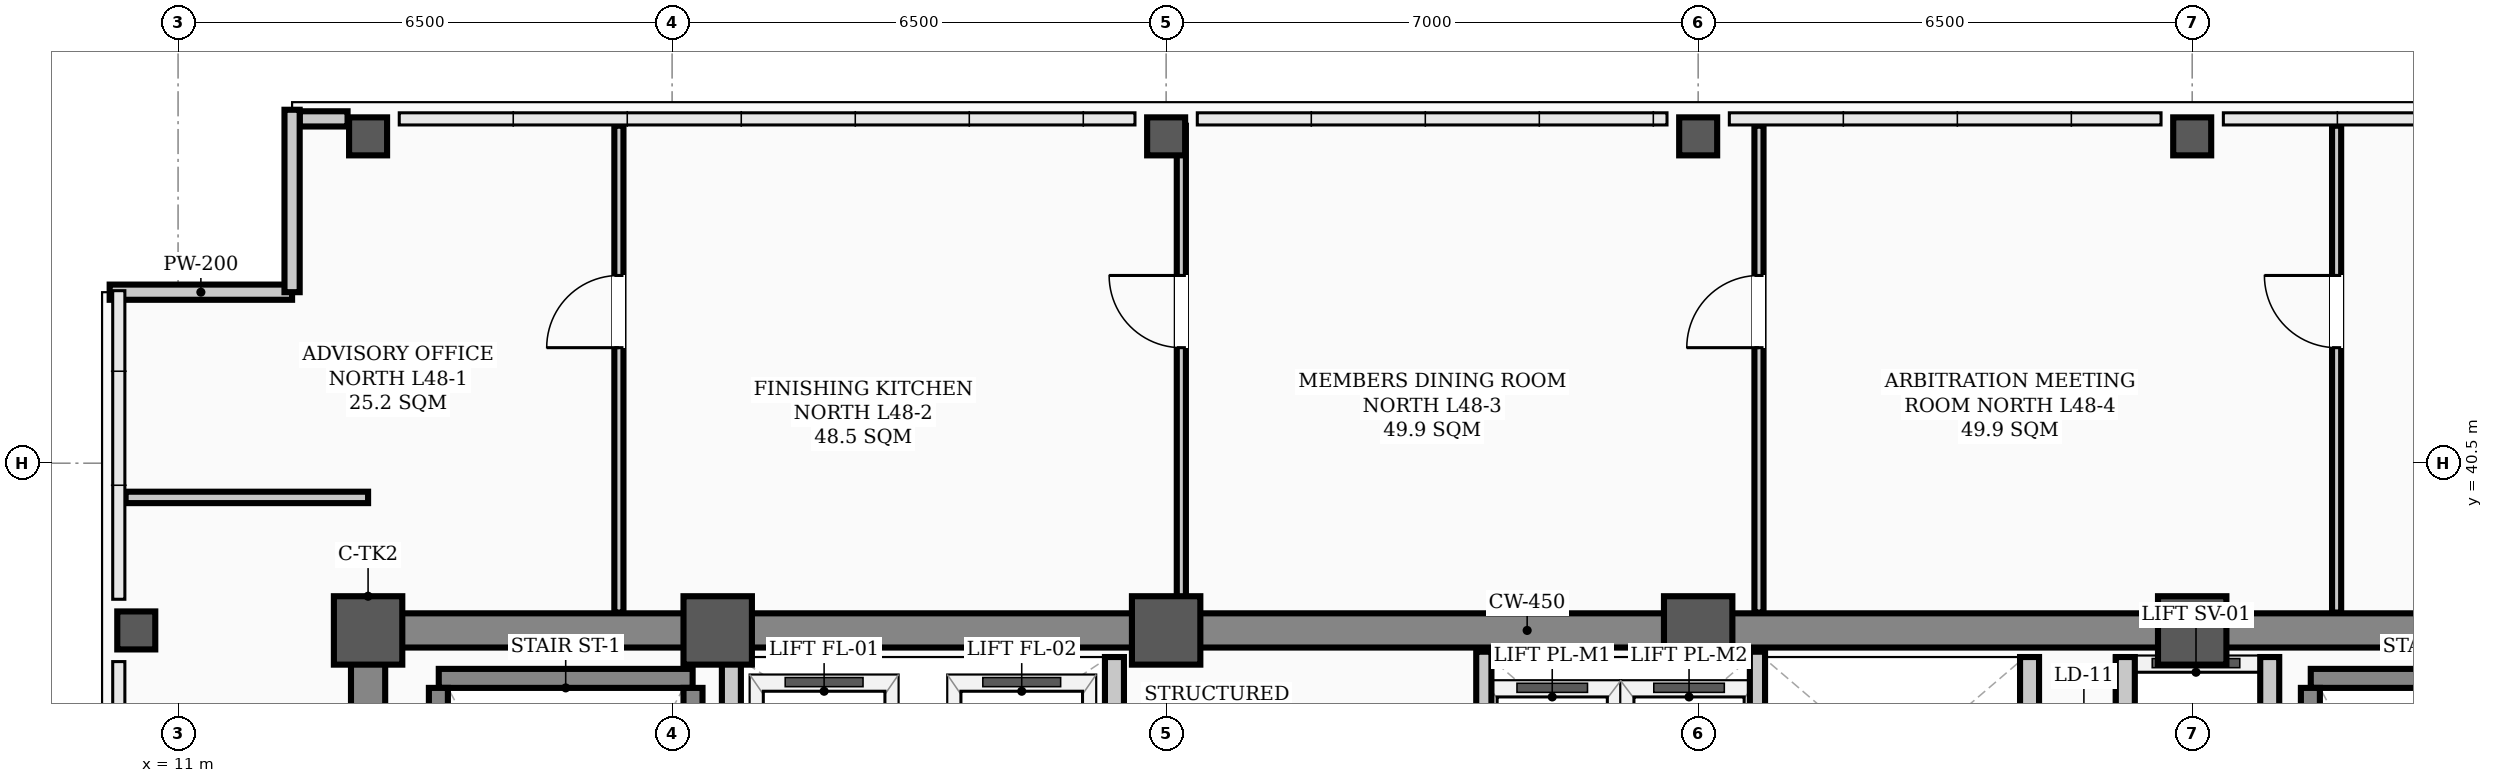
"""IFC4 building model, lengths in metres.
Left out: names, types, materials, properties, quantities, classifications, styles, units other than length and angle.
Written with IfcOpenShell. Run it as: python <this file> out.ifc"""

import sys

from ifc_helpers import new_model, si_unit, direction, frame, frame_2d, origin, origin_2d, place, context, subcontext, project, spatial, rectangle, hollow_rectangle, extrude, element, fill, save


model = new_model("IFC4")
c1 = context("Model", 3, precision=1e-05, world=origin(), true_north=direction((0.0, 1.0)))
c2 = subcontext(c1, "Body", "Model", "MODEL_VIEW")
j1 = project(units=[si_unit("LENGTHUNIT", "METRE"), si_unit("PLANEANGLEUNIT", "RADIAN")], contexts=[c1])
p1 = place(None, origin())
s1 = spatial("IfcSite", under=j1, at=p1, CompositionType="ELEMENT")
p2 = place(p1, origin())
s2 = spatial("IfcBuilding", under=s1, at=p2, CompositionType="ELEMENT")
p3 = place(p2, frame((0.0, 0.0, 192.9)))
s3 = spatial("IfcBuildingStorey", under=s2, at=p3, CompositionType="ELEMENT", Elevation=192.9)
for number, where, z_axis, x_axis in (
    (1, (13.5, 38.3, 0.0), (0.0, 0.0, 1.0), (1.0, 0.0, 0.0)),
    (2, (18.1, 38.3, 0.0), (0.0, 0.0, 1.0), (1.0, 0.0, 0.0)),
    (3, (24.0, 38.3, 0.0), (0.0, 0.0, 1.0), (1.0, 0.0, 0.0)),
    (4, (31.0, 38.3, 0.0), (0.0, 0.0, 1.0), (1.0, 0.0, 0.0)),
    (5, (37.5, 38.3, 0.0), (0.0, 0.0, 1.0), (1.0, 0.0, 0.0)),
):
    element("IfcColumn", number, at=place(p3, frame(where, z_axis=z_axis, x_axis=x_axis)), inside=s3, PredefinedType="COLUMN", context=c2, shape_type="SweptSolid", body=[
        extrude(hollow_rectangle(XDim=0.9, YDim=0.9, WallThickness=0.035, InnerFilletRadius=0.017, OuterFilletRadius=0.052, at=origin_2d()), origin(), (0.0, 0.0, 1.0), 3.9),
    ])
p4 = place(p3, frame((10.45, 38.3, 0.0), z_axis=(0.0, 0.0, 1.0), x_axis=(1.0, 0.0, 0.0)))
e6 = element("IfcColumn", 6, at=p4, inside=s3, PredefinedType="COLUMN", context=c2, shape_type="SweptSolid", body=[
    extrude(hollow_rectangle(XDim=0.5, YDim=0.5, WallThickness=0.024, InnerFilletRadius=0.012, OuterFilletRadius=0.036, at=origin_2d()), origin(), (0.0, 0.0, 1.0), 3.9),
])
for number, where, z_axis, x_axis in (
    (7, (13.5, 44.8, 0.0), (0.0, 0.0, 1.0), (1.0, 0.0, 0.0)),
    (8, (24.0, 44.8, 0.0), (0.0, 0.0, 1.0), (1.0, 0.0, 0.0)),
    (9, (31.0, 44.8, 0.0), (0.0, 0.0, 1.0), (1.0, 0.0, 0.0)),
    (10, (37.5, 44.8, 0.0), (0.0, 0.0, 1.0), (1.0, 0.0, 0.0)),
):
    element("IfcColumn", number, at=place(p3, frame(where, z_axis=z_axis, x_axis=x_axis)), inside=s3, PredefinedType="COLUMN", context=c2, shape_type="SweptSolid", body=[
        extrude(hollow_rectangle(XDim=0.5, YDim=0.5, WallThickness=0.024, InnerFilletRadius=0.012, OuterFilletRadius=0.036, at=origin_2d()), origin(), (0.0, 0.0, 1.0), 3.66),
    ])
p5 = place(p3, frame((12.6, 45.03, 0.0), z_axis=(0.0, 0.0, 1.0), x_axis=(1.0, 0.0, 0.0)))
e11 = element("IfcWall", 11, at=p5, inside=s3, PredefinedType="PARAPET", context=c2, shape_type="SweptSolid", body=[
    extrude(rectangle(XDim=0.63, YDim=0.2, at=frame_2d((0.315, 0.0))), origin(), (0.0, 0.0, 1.0), 1.2),
])
for number, where, z_axis, x_axis in (
    (12, (10.1, 42.75, 0.0), (0.0, 0.0, 1.0), (1.0, 0.0, 0.0)),
    (13, (12.5, 42.75, 0.0), (0.0, 0.0, 1.0), (0.0, 1.0, 0.0)),
):
    element("IfcWall", number, at=place(p3, frame(where, z_axis=z_axis, x_axis=x_axis)), inside=s3, PredefinedType="PARAPET", context=c2, shape_type="SweptSolid", body=[
        extrude(rectangle(XDim=2.4, YDim=0.2, at=frame_2d((1.2, 0.0))), origin(), (0.0, 0.0, 1.0), 1.2),
    ])
p6 = place(p3, frame((13.5, 38.3, 0.0), z_axis=(0.0, 0.0, 1.0), x_axis=(1.0, 0.0, 0.0)))
e14 = element("IfcWall", 14, at=p6, inside=s3, PredefinedType="SHEAR", context=c2, shape_type="SweptSolid", body=[
    extrude(rectangle(XDim=30.5, YDim=0.45, at=frame_2d((15.25, 0.0))), origin(), (0.0, 0.0, 1.0), 3.66),
])
p7 = place(p3, frame((13.5, 29.35, 0.0), z_axis=(0.0, 0.0, 1.0), x_axis=(0.0, 1.0, 0.0)))
e15 = element("IfcWall", 15, at=p7, inside=s3, PredefinedType="SHEAR", context=c2, shape_type="SweptSolid", body=[
    extrude(rectangle(XDim=8.6, YDim=0.45, at=frame_2d((4.3, 0.0))), origin(), (0.0, 0.0, 1.0), 3.66),
])
p8 = place(p3, frame((14.43, 37.669, 0.0), z_axis=(0.0, 0.0, 1.0), x_axis=(1.0, 0.0, 0.0)))
e16 = element("IfcWall", 16, at=p8, inside=s3, PredefinedType="STANDARD", context=c2, shape_type="SweptSolid", body=[
    extrude(rectangle(XDim=3.34, YDim=0.25, at=frame_2d((1.67, 0.0))), origin(), (0.0, 0.0, 1.0), 3.66),
])
for number, where, z_axis, x_axis in (
    (17, (14.425, 30.36, 0.0), (0.0, 0.0, 1.0), (0.0, 1.0, 0.0)),
    (18, (17.775, 30.36, 0.0), (0.0, 0.0, 1.0), (0.0, 1.0, 0.0)),
):
    element("IfcWall", number, at=place(p3, frame(where, z_axis=z_axis, x_axis=x_axis)), inside=s3, PredefinedType="STANDARD", context=c2, shape_type="SweptSolid", body=[
        extrude(rectangle(XDim=7.184, YDim=0.25, at=frame_2d((3.592, 0.0))), origin(), (0.0, 0.0, 1.0), 3.66),
    ])
p9 = place(p3, frame((39.06, 37.669, 0.0), z_axis=(0.0, 0.0, 1.0), x_axis=(1.0, 0.0, 0.0)))
e19 = element("IfcWall", 19, at=p9, inside=s3, PredefinedType="STANDARD", context=c2, shape_type="SweptSolid", body=[
    extrude(rectangle(XDim=3.34, YDim=0.25, at=frame_2d((1.67, 0.0))), origin(), (0.0, 0.0, 1.0), 3.66),
])
p10 = place(p3, frame((39.055, 30.36, 0.0), z_axis=(0.0, 0.0, 1.0), x_axis=(0.0, 1.0, 0.0)))
e20 = element("IfcWall", 20, at=p10, inside=s3, PredefinedType="STANDARD", context=c2, shape_type="SweptSolid", body=[
    extrude(rectangle(XDim=7.184, YDim=0.25, at=frame_2d((3.592, 0.0))), origin(), (0.0, 0.0, 1.0), 3.66),
])
p11 = place(p3, frame((36.62, 31.95, 0.0), z_axis=(0.0, 0.0, 1.0), x_axis=(0.0, 1.0, 0.0)))
e21 = element("IfcWall", 21, at=p11, inside=s3, PredefinedType="STANDARD", context=c2, shape_type="SweptSolid", body=[
    extrude(rectangle(XDim=6.0, YDim=0.25, at=frame_2d((3.0, 0.0))), origin(), (0.0, 0.0, 1.0), 2.24),
])
p12 = place(p11, frame((0.9, 0.0, 0.0)))
e22 = element("IfcOpeningElement", 22, at=p12, cuts=e21, PredefinedType="OPENING", context=c2, shape_type="SweptSolid", body=[
    extrude(rectangle(XDim=1.1, YDim=2.08, at=frame_2d((0.55, 1.04))), frame((0.0, 0.135, 0.0), z_axis=(0.0, -1.0, 0.0), x_axis=(1.0, 0.0, 0.0)), (0.0, 0.0, 1.0), 0.27),
])
p13 = place(p11, frame((4.0, 0.0, 0.0)))
e23 = element("IfcOpeningElement", 23, at=p13, cuts=e21, PredefinedType="OPENING", context=c2, shape_type="SweptSolid", body=[
    extrude(rectangle(XDim=1.1, YDim=2.08, at=frame_2d((0.55, 1.04))), frame((0.0, 0.135, 0.0), z_axis=(0.0, -1.0, 0.0), x_axis=(1.0, 0.0, 0.0)), (0.0, 0.0, 1.0), 0.27),
])
p14 = place(p3, frame((38.52, 31.95, 0.0), z_axis=(0.0, 0.0, 1.0), x_axis=(0.0, 1.0, 0.0)))
e24 = element("IfcWall", 24, at=p14, inside=s3, PredefinedType="STANDARD", context=c2, shape_type="SweptSolid", body=[
    extrude(rectangle(XDim=6.0, YDim=0.25, at=frame_2d((3.0, 0.0))), origin(), (0.0, 0.0, 1.0), 2.24),
])
for number, where, z_axis, x_axis in (
    (25, (18.28, 34.62, 0.0), (0.0, 0.0, 1.0), (0.0, 1.0, 0.0)),
    (26, (23.32, 34.62, 0.0), (0.0, 0.0, 1.0), (0.0, 1.0, 0.0)),
):
    element("IfcWall", number, at=place(p3, frame(where, z_axis=z_axis, x_axis=x_axis)), inside=s3, PredefinedType="STANDARD", context=c2, shape_type="SweptSolid", body=[
        extrude(rectangle(XDim=3.33, YDim=0.25, at=frame_2d((1.665, 0.0))), origin(), (0.0, 0.0, 1.0), 2.24),
    ])
p15 = place(p3, frame((35.36, 34.9, 0.0), z_axis=(0.0, 0.0, 1.0), x_axis=(0.0, 1.0, 0.0)))
e27 = element("IfcWall", 27, at=p15, inside=s3, PredefinedType="STANDARD", context=c2, shape_type="SweptSolid", body=[
    extrude(rectangle(XDim=3.05, YDim=0.25, at=frame_2d((1.525, 0.0))), origin(), (0.0, 0.0, 1.0), 2.24),
])
p16 = place(p3, frame((10.31, 40.05, 0.0), z_axis=(0.0, 0.0, 1.0), x_axis=(1.0, 0.0, 0.0)))
e28 = element("IfcWall", 28, at=p16, inside=s3, PredefinedType="PARTITIONING", context=c2, shape_type="SweptSolid", body=[
    extrude(rectangle(XDim=3.19, YDim=0.15, at=frame_2d((1.595, 0.0))), origin(), (0.0, 0.0, 1.0), 2.24),
])
p17 = place(p3, frame((16.8, 38.535, 0.0), z_axis=(0.0, 0.0, 1.0), x_axis=(0.0, 1.0, 0.0)))
e29 = element("IfcWall", 29, at=p17, inside=s3, PredefinedType="PARTITIONING", context=c2, shape_type="SweptSolid", body=[
    extrude(rectangle(XDim=6.405, YDim=0.12, at=frame_2d((3.203, 0.0))), origin(), (0.0, 0.0, 1.0), 2.24),
])
p18 = place(p17, frame((3.485, 0.0, 0.0)))
e30 = element("IfcOpeningElement", 30, at=p18, cuts=e29, PredefinedType="OPENING", context=c2, shape_type="SweptSolid", body=[
    extrude(rectangle(XDim=0.95, YDim=2.08, at=frame_2d((0.475, 1.04))), frame((0.0, 0.07, 0.0), z_axis=(0.0, -1.0, 0.0), x_axis=(1.0, 0.0, 0.0)), (0.0, 0.0, 1.0), 0.14),
])
p19 = place(p3, frame((24.2, 38.535, 0.0), z_axis=(0.0, 0.0, 1.0), x_axis=(0.0, 1.0, 0.0)))
e31 = element("IfcWall", 31, at=p19, inside=s3, PredefinedType="PARTITIONING", context=c2, shape_type="SweptSolid", body=[
    extrude(rectangle(XDim=6.405, YDim=0.12, at=frame_2d((3.203, 0.0))), origin(), (0.0, 0.0, 1.0), 2.24),
])
p20 = place(p19, frame((3.485, 0.0, 0.0)))
e32 = element("IfcOpeningElement", 32, at=p20, cuts=e31, PredefinedType="OPENING", context=c2, shape_type="SweptSolid", body=[
    extrude(rectangle(XDim=0.95, YDim=2.08, at=frame_2d((0.475, 1.04))), frame((0.0, 0.07, 0.0), z_axis=(0.0, -1.0, 0.0), x_axis=(1.0, 0.0, 0.0)), (0.0, 0.0, 1.0), 0.14),
])
p21 = place(p3, frame((31.8, 38.535, 0.0), z_axis=(0.0, 0.0, 1.0), x_axis=(0.0, 1.0, 0.0)))
e33 = element("IfcWall", 33, at=p21, inside=s3, PredefinedType="PARTITIONING", context=c2, shape_type="SweptSolid", body=[
    extrude(rectangle(XDim=6.405, YDim=0.12, at=frame_2d((3.203, 0.0))), origin(), (0.0, 0.0, 1.0), 2.24),
])
p22 = place(p21, frame((3.485, 0.0, 0.0)))
e34 = element("IfcOpeningElement", 34, at=p22, cuts=e33, PredefinedType="OPENING", context=c2, shape_type="SweptSolid", body=[
    extrude(rectangle(XDim=0.95, YDim=2.08, at=frame_2d((0.475, 1.04))), frame((0.0, 0.07, 0.0), z_axis=(0.0, -1.0, 0.0), x_axis=(1.0, 0.0, 0.0)), (0.0, 0.0, 1.0), 0.14),
])
p23 = place(p3, frame((39.4, 38.535, 0.0), z_axis=(0.0, 0.0, 1.0), x_axis=(0.0, 1.0, 0.0)))
e35 = element("IfcWall", 35, at=p23, inside=s3, PredefinedType="PARTITIONING", context=c2, shape_type="SweptSolid", body=[
    extrude(rectangle(XDim=6.405, YDim=0.12, at=frame_2d((3.203, 0.0))), origin(), (0.0, 0.0, 1.0), 2.24),
])
p24 = place(p23, frame((3.485, 0.0, 0.0)))
e36 = element("IfcOpeningElement", 36, at=p24, cuts=e35, PredefinedType="OPENING", context=c2, shape_type="SweptSolid", body=[
    extrude(rectangle(XDim=0.95, YDim=2.08, at=frame_2d((0.475, 1.04))), frame((0.0, 0.07, 0.0), z_axis=(0.0, -1.0, 0.0), x_axis=(1.0, 0.0, 0.0)), (0.0, 0.0, 1.0), 0.14),
])
for number, where, z_axis, x_axis in (
    (37, (28.18, 34.9, 0.0), (0.0, 0.0, 1.0), (0.0, 1.0, 0.0)),
    (38, (31.78, 34.9, 0.0), (0.0, 0.0, 1.0), (0.0, 1.0, 0.0)),
):
    element("IfcWall", number, at=place(p3, frame(where, z_axis=z_axis, x_axis=x_axis)), inside=s3, PredefinedType="STANDARD", context=c2, shape_type="SweptSolid", body=[
        extrude(rectangle(XDim=3.12, YDim=0.2, at=frame_2d((1.56, 0.0))), origin(), (0.0, 0.0, 1.0), 2.24),
    ])
p25 = place(p18, origin())
e39 = element("IfcDoor", 39, at=p25, inside=s3, OperationType="SINGLE_SWING_LEFT", PredefinedType="DOOR", context=c2, shape_type="SweptSolid", body=[
    extrude(rectangle(XDim=0.95, YDim=2.08, at=frame_2d((0.475, 1.04))), frame((0.0, 0.025, 0.0), z_axis=(0.0, -1.0, 0.0), x_axis=(1.0, 0.0, 0.0)), (0.0, 0.0, 1.0), 0.05),
])
fill(e30, e39)
p26 = place(p20, origin())
e40 = element("IfcDoor", 40, at=p26, inside=s3, OperationType="SINGLE_SWING_RIGHT", PredefinedType="DOOR", context=c2, shape_type="SweptSolid", body=[
    extrude(rectangle(XDim=0.95, YDim=2.08, at=frame_2d((0.475, 1.04))), frame((0.0, 0.025, 0.0), z_axis=(0.0, -1.0, 0.0), x_axis=(1.0, 0.0, 0.0)), (0.0, 0.0, 1.0), 0.05),
])
fill(e32, e40)
p27 = place(p22, origin())
e41 = element("IfcDoor", 41, at=p27, inside=s3, OperationType="SINGLE_SWING_LEFT", PredefinedType="DOOR", context=c2, shape_type="SweptSolid", body=[
    extrude(rectangle(XDim=0.95, YDim=2.08, at=frame_2d((0.475, 1.04))), frame((0.0, 0.025, 0.0), z_axis=(0.0, -1.0, 0.0), x_axis=(1.0, 0.0, 0.0)), (0.0, 0.0, 1.0), 0.05),
])
fill(e34, e41)
p28 = place(p24, origin())
e42 = element("IfcDoor", 42, at=p28, inside=s3, OperationType="SINGLE_SWING_RIGHT", PredefinedType="DOOR", context=c2, shape_type="SweptSolid", body=[
    extrude(rectangle(XDim=0.95, YDim=2.08, at=frame_2d((0.475, 1.04))), frame((0.0, 0.025, 0.0), z_axis=(0.0, -1.0, 0.0), x_axis=(1.0, 0.0, 0.0)), (0.0, 0.0, 1.0), 0.05),
])
fill(e36, e42)
save(model, sys.argv[1])
